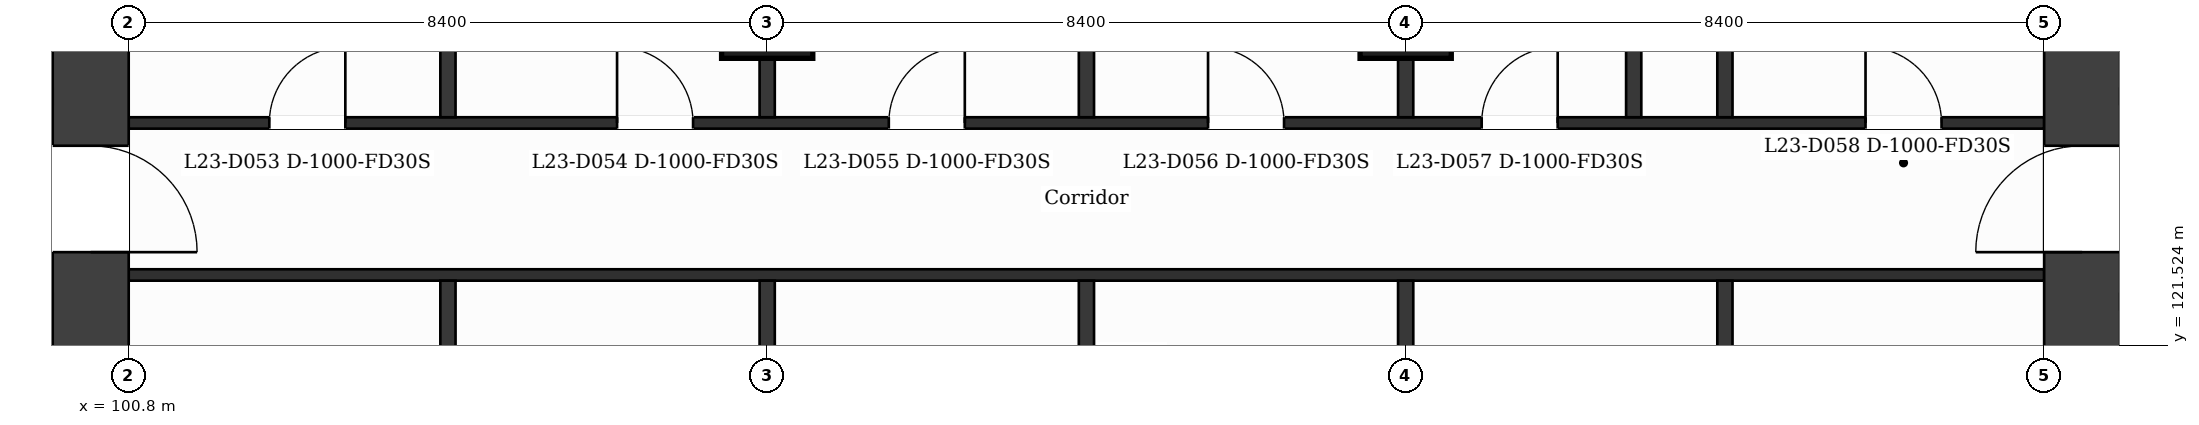
"""IFC4 building model, lengths in metres.
Left out: names, types, materials, properties, quantities, classifications, styles, units other than length and angle.
Written with IfcOpenShell. Run it as: python <this file> out.ifc"""

import sys

from ifc_helpers import new_model, si_unit, direction, frame, frame_2d, origin, origin_2d, place, context, subcontext, project, spatial, rectangle, extrude, element, fill, save


model = new_model("IFC4")
c1 = context("Model", 3, precision=1e-05, world=origin(), true_north=direction((0.0, 1.0)))
c2 = subcontext(c1, "Body", "Model", "MODEL_VIEW")
j1 = project(units=[si_unit("LENGTHUNIT", "METRE"), si_unit("PLANEANGLEUNIT", "RADIAN")], contexts=[c1])
p1 = place(None, origin())
s1 = spatial("IfcSite", under=j1, at=p1, CompositionType="ELEMENT")
p2 = place(p1, origin())
s2 = spatial("IfcBuilding", under=s1, at=p2, CompositionType="ELEMENT")
p3 = place(p2, frame((0.0, 0.0, 102.1)))
s3 = spatial("IfcBuildingStorey", under=s2, at=p3, CompositionType="ELEMENT", Elevation=102.1)
p4 = place(p3, frame((100.3, 131.9, 0.0), z_axis=(0.0, 0.0, 1.0), x_axis=(0.0, -1.0, 0.0)))
e1 = element("IfcWall", 1, at=p4, inside=s3, PredefinedType="SHEAR", context=c2, shape_type="SweptSolid", body=[
    extrude(rectangle(XDim=21.0, YDim=1.0, at=frame_2d((10.5, 0.0))), origin(), (0.0, 0.0, 1.0), 3.7),
])
p5 = place(p4, frame((7.75, 0.0, 0.0)))
e2 = element("IfcOpeningElement", 2, at=p5, cuts=e1, PredefinedType="OPENING", context=c2, shape_type="SweptSolid", body=[
    extrude(rectangle(XDim=1.4, YDim=2.1, at=frame_2d((0.7, 1.05))), frame((0.0, 0.51, 0.0), z_axis=(0.0, -1.0, 0.0), x_axis=(1.0, 0.0, 0.0)), (0.0, 0.0, 1.0), 1.02),
])
p6 = place(p3, frame((126.5, 110.9, 0.0), z_axis=(0.0, 0.0, 1.0), x_axis=(0.0, 1.0, 0.0)))
e3 = element("IfcWall", 3, at=p6, inside=s3, PredefinedType="SHEAR", context=c2, shape_type="SweptSolid", body=[
    extrude(rectangle(XDim=21.0, YDim=1.0, at=frame_2d((10.5, 0.0))), origin(), (0.0, 0.0, 1.0), 3.7),
])
p7 = place(p6, frame((11.85, 0.0, 0.0)))
e4 = element("IfcOpeningElement", 4, at=p7, cuts=e3, PredefinedType="OPENING", context=c2, shape_type="SweptSolid", body=[
    extrude(rectangle(XDim=1.4, YDim=2.1, at=frame_2d((0.7, 1.05))), frame((0.0, 0.51, 0.0), z_axis=(0.0, -1.0, 0.0), x_axis=(1.0, 0.0, 0.0)), (0.0, 0.0, 1.0), 1.02),
])
for number, where, z_axis, x_axis in (
    (5, (109.2, 125.9, 0.0), (0.0, 0.0, 1.0), (1.0, 0.0, 0.0)),
    (6, (117.6, 125.9, 0.0), (0.0, 0.0, 1.0), (1.0, 0.0, 0.0)),
):
    element("IfcColumn", number, at=place(p3, frame(where, z_axis=z_axis, x_axis=x_axis)), inside=s3, PredefinedType="COLUMN", context=c2, shape_type="SweptSolid", body=[
        extrude(rectangle(XDim=1.2, YDim=1.2, at=origin_2d()), origin(), (0.0, 0.0, 1.0), 3.7),
    ])
p8 = place(p3, frame((95.227, 122.1, 0.0), z_axis=(0.0, 0.0, 1.0), x_axis=(1.0, 0.0, 0.0)))
e7 = element("IfcWall", 7, at=p8, inside=s3, PredefinedType="PARTITIONING", context=c2, shape_type="SweptSolid", body=[
    extrude(rectangle(XDim=4.573, YDim=0.2, at=frame_2d((2.287, 0.0))), origin(), (0.0, 0.0, 1.0), 3.38),
])
p9 = place(p8, frame((0.693, 0.0, 0.0)))
e8 = element("IfcOpeningElement", 8, at=p9, cuts=e7, PredefinedType="OPENING", context=c2, shape_type="SweptSolid", body=[
    extrude(rectangle(XDim=0.9, YDim=2.1, at=frame_2d((0.45, 1.05))), frame((0.0, 0.11, 0.0), z_axis=(0.0, -1.0, 0.0), x_axis=(1.0, 0.0, 0.0)), (0.0, 0.0, 1.0), 0.22),
])
p10 = place(p8, frame((2.98, 0.0, 0.0)))
e9 = element("IfcOpeningElement", 9, at=p10, cuts=e7, PredefinedType="OPENING", context=c2, shape_type="SweptSolid", body=[
    extrude(rectangle(XDim=0.9, YDim=2.1, at=frame_2d((0.45, 1.05))), frame((0.0, 0.11, 0.0), z_axis=(0.0, -1.0, 0.0), x_axis=(1.0, 0.0, 0.0)), (0.0, 0.0, 1.0), 0.22),
])
p11 = place(p3, frame((100.8, 122.45, 0.0), z_axis=(0.0, 0.0, 1.0), x_axis=(1.0, 0.0, 0.0)))
e10 = element("IfcWall", 10, at=p11, inside=s3, PredefinedType="PARTITIONING", context=c2, shape_type="SweptSolid", body=[
    extrude(rectangle(XDim=25.2, YDim=0.15, at=frame_2d((12.6, 0.0))), origin(), (0.0, 0.0, 1.0), 3.38),
])
p12 = place(p3, frame((100.8, 124.45, 0.0), z_axis=(0.0, 0.0, 1.0), x_axis=(1.0, 0.0, 0.0)))
e11 = element("IfcWall", 11, at=p12, inside=s3, PredefinedType="PARTITIONING", context=c2, shape_type="SweptSolid", body=[
    extrude(rectangle(XDim=25.2, YDim=0.15, at=frame_2d((12.6, 0.0))), origin(), (0.0, 0.0, 1.0), 3.38),
])
p13 = place(p12, frame((1.85, 0.0, 0.0)))
e12 = element("IfcOpeningElement", 12, at=p13, cuts=e11, PredefinedType="OPENING", context=c2, shape_type="SweptSolid", body=[
    extrude(rectangle(XDim=1.0, YDim=2.1, at=frame_2d((0.5, 1.05))), frame((0.0, 0.085, 0.0), z_axis=(0.0, -1.0, 0.0), x_axis=(1.0, 0.0, 0.0)), (0.0, 0.0, 1.0), 0.17),
])
p14 = place(p12, frame((6.425, 0.0, 0.0)))
e13 = element("IfcOpeningElement", 13, at=p14, cuts=e11, PredefinedType="OPENING", context=c2, shape_type="SweptSolid", body=[
    extrude(rectangle(XDim=1.0, YDim=2.1, at=frame_2d((0.5, 1.05))), frame((0.0, 0.085, 0.0), z_axis=(0.0, -1.0, 0.0), x_axis=(1.0, 0.0, 0.0)), (0.0, 0.0, 1.0), 0.17),
])
p15 = place(p12, frame((10.0, 0.0, 0.0)))
e14 = element("IfcOpeningElement", 14, at=p15, cuts=e11, PredefinedType="OPENING", context=c2, shape_type="SweptSolid", body=[
    extrude(rectangle(XDim=1.0, YDim=2.1, at=frame_2d((0.5, 1.05))), frame((0.0, 0.085, 0.0), z_axis=(0.0, -1.0, 0.0), x_axis=(1.0, 0.0, 0.0)), (0.0, 0.0, 1.0), 0.17),
])
p16 = place(p12, frame((14.2, 0.0, 0.0)))
e15 = element("IfcOpeningElement", 15, at=p16, cuts=e11, PredefinedType="OPENING", context=c2, shape_type="SweptSolid", body=[
    extrude(rectangle(XDim=1.0, YDim=2.1, at=frame_2d((0.5, 1.05))), frame((0.0, 0.085, 0.0), z_axis=(0.0, -1.0, 0.0), x_axis=(1.0, 0.0, 0.0)), (0.0, 0.0, 1.0), 0.17),
])
p17 = place(p12, frame((17.8, 0.0, 0.0)))
e16 = element("IfcOpeningElement", 16, at=p17, cuts=e11, PredefinedType="OPENING", context=c2, shape_type="SweptSolid", body=[
    extrude(rectangle(XDim=1.0, YDim=2.1, at=frame_2d((0.5, 1.05))), frame((0.0, 0.085, 0.0), z_axis=(0.0, -1.0, 0.0), x_axis=(1.0, 0.0, 0.0)), (0.0, 0.0, 1.0), 0.17),
])
p18 = place(p12, frame((22.85, 0.0, 0.0)))
e17 = element("IfcOpeningElement", 17, at=p18, cuts=e11, PredefinedType="OPENING", context=c2, shape_type="SweptSolid", body=[
    extrude(rectangle(XDim=1.0, YDim=2.1, at=frame_2d((0.5, 1.05))), frame((0.0, 0.085, 0.0), z_axis=(0.0, -1.0, 0.0), x_axis=(1.0, 0.0, 0.0)), (0.0, 0.0, 1.0), 0.17),
])
p19 = place(p3, frame((127.0, 124.8, 0.0), z_axis=(0.0, 0.0, 1.0), x_axis=(1.0, 0.0, 0.0)))
e18 = element("IfcWall", 18, at=p19, inside=s3, PredefinedType="PARTITIONING", context=c2, shape_type="SweptSolid", body=[
    extrude(rectangle(XDim=4.649, YDim=0.2, at=frame_2d((2.324, 0.0))), origin(), (0.0, 0.0, 1.0), 3.38),
])
p20 = place(p19, frame((0.743, 0.0, 0.0)))
e19 = element("IfcOpeningElement", 19, at=p20, cuts=e18, PredefinedType="OPENING", context=c2, shape_type="SweptSolid", body=[
    extrude(rectangle(XDim=1.1, YDim=2.1, at=frame_2d((0.55, 1.05))), frame((0.0, 0.11, 0.0), z_axis=(0.0, -1.0, 0.0), x_axis=(1.0, 0.0, 0.0)), (0.0, 0.0, 1.0), 0.22),
])
p21 = place(p3, frame((105.0, 109.075, 0.0), z_axis=(0.0, 0.0, 1.0), x_axis=(0.0, 1.0, 0.0)))
e20 = element("IfcWall", 20, at=p21, inside=s3, PredefinedType="PARTITIONING", context=c2, shape_type="SweptSolid", body=[
    extrude(rectangle(XDim=13.3, YDim=0.2, at=frame_2d((6.65, 0.0))), origin(), (0.0, 0.0, 1.0), 3.38),
])
p22 = place(p3, frame((105.0, 124.525, 0.0), z_axis=(0.0, 0.0, 1.0), x_axis=(0.0, 1.0, 0.0)))
e21 = element("IfcWall", 21, at=p22, inside=s3, PredefinedType="PARTITIONING", context=c2, shape_type="SweptSolid", body=[
    extrude(rectangle(XDim=9.2, YDim=0.2, at=frame_2d((4.6, 0.0))), origin(), (0.0, 0.0, 1.0), 3.38),
])
p23 = place(p3, frame((109.2, 109.075, 0.0), z_axis=(0.0, 0.0, 1.0), x_axis=(0.0, 1.0, 0.0)))
e22 = element("IfcWall", 22, at=p23, inside=s3, PredefinedType="PARTITIONING", context=c2, shape_type="SweptSolid", body=[
    extrude(rectangle(XDim=13.3, YDim=0.2, at=frame_2d((6.65, 0.0))), origin(), (0.0, 0.0, 1.0), 3.38),
])
p24 = place(p3, frame((109.2, 124.525, 0.0), z_axis=(0.0, 0.0, 1.0), x_axis=(0.0, 1.0, 0.0)))
e23 = element("IfcWall", 23, at=p24, inside=s3, PredefinedType="PARTITIONING", context=c2, shape_type="SweptSolid", body=[
    extrude(rectangle(XDim=9.2, YDim=0.2, at=frame_2d((4.6, 0.0))), origin(), (0.0, 0.0, 1.0), 3.38),
])
p25 = place(p3, frame((113.4, 109.075, 0.0), z_axis=(0.0, 0.0, 1.0), x_axis=(0.0, 1.0, 0.0)))
e24 = element("IfcWall", 24, at=p25, inside=s3, PredefinedType="PARTITIONING", context=c2, shape_type="SweptSolid", body=[
    extrude(rectangle(XDim=13.3, YDim=0.2, at=frame_2d((6.65, 0.0))), origin(), (0.0, 0.0, 1.0), 3.38),
])
p26 = place(p3, frame((113.4, 124.525, 0.0), z_axis=(0.0, 0.0, 1.0), x_axis=(0.0, 1.0, 0.0)))
e25 = element("IfcWall", 25, at=p26, inside=s3, PredefinedType="PARTITIONING", context=c2, shape_type="SweptSolid", body=[
    extrude(rectangle(XDim=9.2, YDim=0.2, at=frame_2d((4.6, 0.0))), origin(), (0.0, 0.0, 1.0), 3.38),
])
p27 = place(p3, frame((117.6, 109.075, 0.0), z_axis=(0.0, 0.0, 1.0), x_axis=(0.0, 1.0, 0.0)))
e26 = element("IfcWall", 26, at=p27, inside=s3, PredefinedType="PARTITIONING", context=c2, shape_type="SweptSolid", body=[
    extrude(rectangle(XDim=13.3, YDim=0.2, at=frame_2d((6.65, 0.0))), origin(), (0.0, 0.0, 1.0), 3.38),
])
p28 = place(p3, frame((117.6, 124.525, 0.0), z_axis=(0.0, 0.0, 1.0), x_axis=(0.0, 1.0, 0.0)))
e27 = element("IfcWall", 27, at=p28, inside=s3, PredefinedType="PARTITIONING", context=c2, shape_type="SweptSolid", body=[
    extrude(rectangle(XDim=9.2, YDim=0.2, at=frame_2d((4.6, 0.0))), origin(), (0.0, 0.0, 1.0), 3.38),
])
p29 = place(p3, frame((120.6, 124.525, 0.0), z_axis=(0.0, 0.0, 1.0), x_axis=(0.0, 1.0, 0.0)))
e28 = element("IfcWall", 28, at=p29, inside=s3, PredefinedType="PARTITIONING", context=c2, shape_type="SweptSolid", body=[
    extrude(rectangle(XDim=5.825, YDim=0.2, at=frame_2d((2.913, 0.0))), origin(), (0.0, 0.0, 1.0), 3.38),
])
p30 = place(p3, frame((121.8, 109.075, 0.0), z_axis=(0.0, 0.0, 1.0), x_axis=(0.0, 1.0, 0.0)))
e29 = element("IfcWall", 29, at=p30, inside=s3, PredefinedType="PARTITIONING", context=c2, shape_type="SweptSolid", body=[
    extrude(rectangle(XDim=13.3, YDim=0.2, at=frame_2d((6.65, 0.0))), origin(), (0.0, 0.0, 1.0), 3.38),
])
p31 = place(p3, frame((121.8, 124.525, 0.0), z_axis=(0.0, 0.0, 1.0), x_axis=(0.0, 1.0, 0.0)))
e30 = element("IfcWall", 30, at=p31, inside=s3, PredefinedType="PARTITIONING", context=c2, shape_type="SweptSolid", body=[
    extrude(rectangle(XDim=9.2, YDim=0.2, at=frame_2d((4.6, 0.0))), origin(), (0.0, 0.0, 1.0), 3.38),
])
p32 = place(p13, origin())
e31 = element("IfcDoor", 31, at=p32, inside=s3, OperationType="SINGLE_SWING_RIGHT", PredefinedType="DOOR", context=c2, shape_type="SweptSolid", body=[
    extrude(rectangle(XDim=1.0, YDim=2.1, at=frame_2d((0.5, 1.05))), frame((0.0, 0.025, 0.0), z_axis=(0.0, -1.0, 0.0), x_axis=(1.0, 0.0, 0.0)), (0.0, 0.0, 1.0), 0.05),
])
fill(e12, e31)
p33 = place(p14, origin())
e32 = element("IfcDoor", 32, at=p33, inside=s3, OperationType="SINGLE_SWING_LEFT", PredefinedType="DOOR", context=c2, shape_type="SweptSolid", body=[
    extrude(rectangle(XDim=1.0, YDim=2.1, at=frame_2d((0.5, 1.05))), frame((0.0, 0.025, 0.0), z_axis=(0.0, -1.0, 0.0), x_axis=(1.0, 0.0, 0.0)), (0.0, 0.0, 1.0), 0.05),
])
fill(e13, e32)
p34 = place(p15, origin())
e33 = element("IfcDoor", 33, at=p34, inside=s3, OperationType="SINGLE_SWING_RIGHT", PredefinedType="DOOR", context=c2, shape_type="SweptSolid", body=[
    extrude(rectangle(XDim=1.0, YDim=2.1, at=frame_2d((0.5, 1.05))), frame((0.0, 0.025, 0.0), z_axis=(0.0, -1.0, 0.0), x_axis=(1.0, 0.0, 0.0)), (0.0, 0.0, 1.0), 0.05),
])
fill(e14, e33)
p35 = place(p16, origin())
e34 = element("IfcDoor", 34, at=p35, inside=s3, OperationType="SINGLE_SWING_LEFT", PredefinedType="DOOR", context=c2, shape_type="SweptSolid", body=[
    extrude(rectangle(XDim=1.0, YDim=2.1, at=frame_2d((0.5, 1.05))), frame((0.0, 0.025, 0.0), z_axis=(0.0, -1.0, 0.0), x_axis=(1.0, 0.0, 0.0)), (0.0, 0.0, 1.0), 0.05),
])
fill(e15, e34)
p36 = place(p17, origin())
e35 = element("IfcDoor", 35, at=p36, inside=s3, OperationType="SINGLE_SWING_RIGHT", PredefinedType="DOOR", context=c2, shape_type="SweptSolid", body=[
    extrude(rectangle(XDim=1.0, YDim=2.1, at=frame_2d((0.5, 1.05))), frame((0.0, 0.025, 0.0), z_axis=(0.0, -1.0, 0.0), x_axis=(1.0, 0.0, 0.0)), (0.0, 0.0, 1.0), 0.05),
])
fill(e16, e35)
p37 = place(p18, origin())
e36 = element("IfcDoor", 36, at=p37, inside=s3, OperationType="SINGLE_SWING_LEFT", PredefinedType="DOOR", context=c2, shape_type="SweptSolid", body=[
    extrude(rectangle(XDim=1.0, YDim=2.1, at=frame_2d((0.5, 1.05))), frame((0.0, 0.025, 0.0), z_axis=(0.0, -1.0, 0.0), x_axis=(1.0, 0.0, 0.0)), (0.0, 0.0, 1.0), 0.05),
])
fill(e17, e36)
p38 = place(p5, origin())
e37 = element("IfcDoor", 37, at=p38, inside=s3, OperationType="SINGLE_SWING_RIGHT", PredefinedType="DOOR", context=c2, shape_type="SweptSolid", body=[
    extrude(rectangle(XDim=1.4, YDim=2.1, at=frame_2d((0.7, 1.05))), frame((0.0, 0.025, 0.0), z_axis=(0.0, -1.0, 0.0), x_axis=(1.0, 0.0, 0.0)), (0.0, 0.0, 1.0), 0.05),
])
fill(e2, e37)
p39 = place(p7, origin())
e38 = element("IfcDoor", 38, at=p39, inside=s3, OperationType="SINGLE_SWING_LEFT", PredefinedType="DOOR", context=c2, shape_type="SweptSolid", body=[
    extrude(rectangle(XDim=1.4, YDim=2.1, at=frame_2d((0.7, 1.05))), frame((0.0, 0.025, 0.0), z_axis=(0.0, -1.0, 0.0), x_axis=(1.0, 0.0, 0.0)), (0.0, 0.0, 1.0), 0.05),
])
fill(e4, e38)
save(model, sys.argv[1])
